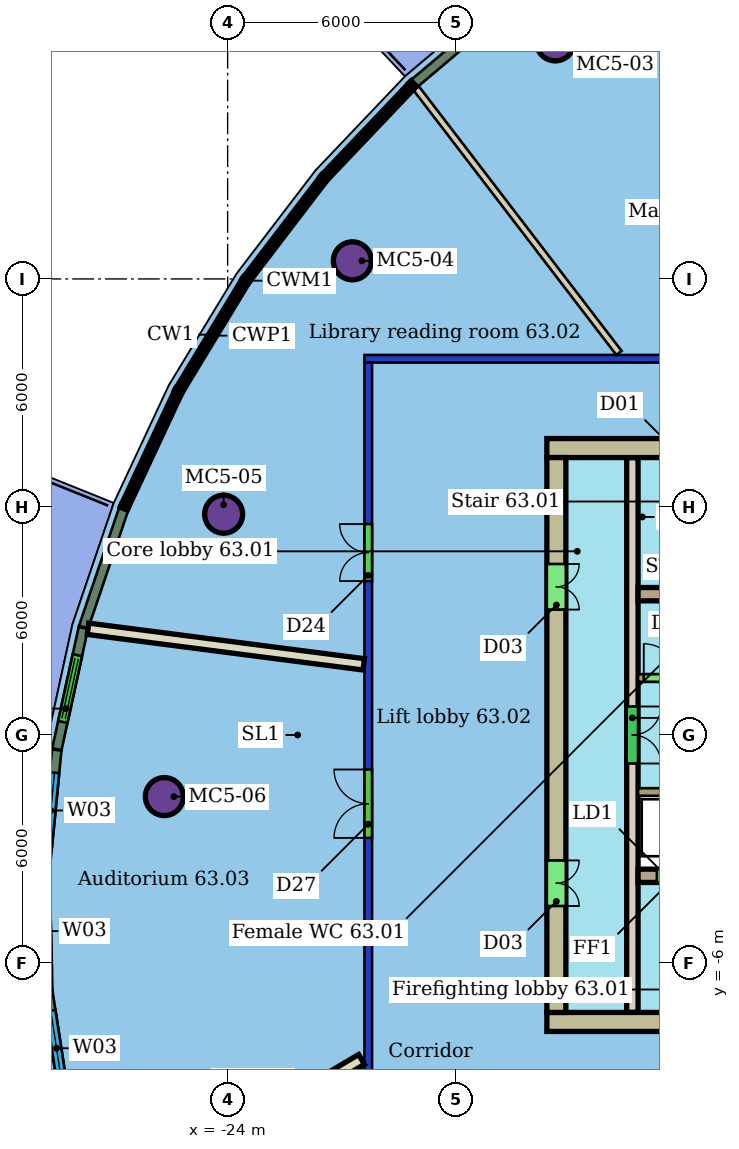
"""IFC4 building model, lengths in metres.
Left out: names, types, materials, properties, quantities, classifications, styles, units other than length and angle.
Written with IfcOpenShell. Run it as: python <this file> out.ifc"""

import sys

from ifc_helpers import new_model, si_unit, direction, frame, frame_2d, origin, origin_2d, place, context, subcontext, project, spatial, rectangle, hollow_circle, extrude, element, fill, save


model = new_model("IFC4")
c1 = context("Model", 3, precision=1e-05, world=origin(), true_north=direction((0.0, 1.0)))
c2 = subcontext(c1, "Body", "Model", "MODEL_VIEW")
j1 = project(units=[si_unit("LENGTHUNIT", "METRE"), si_unit("PLANEANGLEUNIT", "RADIAN")], contexts=[c1])
p1 = place(None, origin())
s1 = spatial("IfcSite", under=j1, at=p1, CompositionType="ELEMENT")
p2 = place(p1, origin())
s2 = spatial("IfcBuilding", under=s1, at=p2, CompositionType="ELEMENT")
p3 = place(p2, frame((0.0, 0.0, 257.7)))
s3 = spatial("IfcBuildingStorey", under=s2, at=p3, CompositionType="ELEMENT", Elevation=257.7)
for number, where, z_axis, x_axis in (
    (1, (-15.377, 18.238, 0.0), (0.0, 0.0, 1.0), (1.0, 0.0, 0.0)),
    (2, (-20.718, 12.477, 0.0), (0.0, 0.0, 1.0), (1.0, 0.0, 0.0)),
    (3, (-24.106, 5.81, 0.0), (0.0, 0.0, 1.0), (1.0, 0.0, 0.0)),
    (4, (-25.666, -1.62, 0.0), (0.0, 0.0, 1.0), (1.0, 0.0, 0.0)),
):
    element("IfcColumn", number, at=place(p3, frame(where, z_axis=z_axis, x_axis=x_axis)), inside=s3, PredefinedType="COLUMN", context=c2, shape_type="SweptSolid", body=[
        extrude(hollow_circle(Radius=0.5, WallThickness=0.04, at=origin_2d()), origin(), (0.0, 0.0, 1.0), 3.45),
    ])
p4 = place(p3, frame((-20.3, -9.8, 0.0), z_axis=(0.0, 0.0, 1.0), x_axis=(0.0, 1.0, 0.0)))
e5 = element("IfcWall", 5, at=p4, inside=s3, PredefinedType="PARTITIONING", context=c2, shape_type="SweptSolid", body=[
    extrude(rectangle(XDim=19.6, YDim=0.2, at=frame_2d((9.8, 0.0))), origin(), (0.0, 0.0, 1.0), 3.1),
])
p5 = place(p4, frame((13.85, 0.0, 0.0)))
e6 = element("IfcOpeningElement", 6, at=p5, cuts=e5, PredefinedType="OPENING", context=c2, shape_type="SweptSolid", body=[
    extrude(rectangle(XDim=1.5, YDim=2.1, at=frame_2d((0.75, 1.05))), frame((0.0, 0.11, 0.0), z_axis=(0.0, -1.0, 0.0), x_axis=(1.0, 0.0, 0.0)), (0.0, 0.0, 1.0), 0.22),
])
p6 = place(p4, frame((7.092, 0.0, 0.0)))
e7 = element("IfcOpeningElement", 7, at=p6, cuts=e5, PredefinedType="OPENING", context=c2, shape_type="SweptSolid", body=[
    extrude(rectangle(XDim=1.8, YDim=2.4, at=frame_2d((0.9, 1.2))), frame((0.0, 0.11, 0.0), z_axis=(0.0, -1.0, 0.0), x_axis=(1.0, 0.0, 0.0)), (0.0, 0.0, 1.0), 0.22),
])
p7 = place(p3, frame((-20.4, 9.9, 0.0), z_axis=(0.0, 0.0, 1.0), x_axis=(1.0, 0.0, 0.0)))
e8 = element("IfcWall", 8, at=p7, inside=s3, PredefinedType="PARTITIONING", context=c2, shape_type="SweptSolid", body=[
    extrude(rectangle(XDim=28.8, YDim=0.2, at=frame_2d((14.4, 0.0))), origin(), (0.0, 0.0, 1.0), 3.1),
])
p8 = place(p7, frame((9.976, 0.0, 0.0)))
e9 = element("IfcOpeningElement", 9, at=p8, cuts=e8, PredefinedType="OPENING", context=c2, shape_type="SweptSolid", body=[
    extrude(rectangle(XDim=1.5, YDim=2.1, at=frame_2d((0.75, 1.05))), frame((0.0, 0.11, 0.0), z_axis=(0.0, -1.0, 0.0), x_axis=(1.0, 0.0, 0.0)), (0.0, 0.0, 1.0), 0.22),
])
p9 = place(p7, frame((21.079, 0.0, 0.0)))
e10 = element("IfcOpeningElement", 10, at=p9, cuts=e8, PredefinedType="OPENING", context=c2, shape_type="SweptSolid", body=[
    extrude(rectangle(XDim=1.0, YDim=2.1, at=frame_2d((0.5, 1.05))), frame((0.0, 0.11, 0.0), z_axis=(0.0, -1.0, 0.0), x_axis=(1.0, 0.0, 0.0)), (0.0, 0.0, 1.0), 0.22),
])
p10 = place(p3, frame((-19.042, 17.022, 0.0), z_axis=(0.0, 0.0, 1.0), x_axis=(0.608204407096, -0.793780447724, 0.0)))
e11 = element("IfcWall", 11, at=p10, inside=s3, PredefinedType="PARTITIONING", context=c2, shape_type="SweptSolid", body=[
    extrude(rectangle(XDim=8.779, YDim=0.175, at=frame_2d((4.389, 0.0))), origin(), (0.0, 0.0, 1.0), 3.45),
])
p11 = place(p3, frame((-27.674, 2.795, 0.0), z_axis=(0.0, 0.0, 1.0), x_axis=(0.991788248046, -0.127890855958, 0.0)))
e12 = element("IfcWall", 12, at=p11, inside=s3, PredefinedType="PARTITIONING", context=c2, shape_type="SweptSolid", body=[
    extrude(rectangle(XDim=7.315, YDim=0.3, at=frame_2d((3.658, 0.0))), origin(), (0.0, 0.0, 1.0), 3.45),
])
p12 = place(p3, frame((-27.309, -12.566, 0.0), z_axis=(0.0, 0.0, 1.0), x_axis=(0.861365558052, 0.507985605506, 0.0)))
e13 = element("IfcWall", 13, at=p12, inside=s3, PredefinedType="PARTITIONING", context=c2, shape_type="SweptSolid", body=[
    extrude(rectangle(XDim=7.932, YDim=0.3, at=frame_2d((3.966, 0.0))), origin(), (0.0, 0.0, 1.0), 3.45),
])
for number, where, z_axis, x_axis in (
    (14, (-16.581, 19.26, 0.0), (0.0, 0.0, 1.0), (-0.765, -0.645, 0.0)),
    (15, (-26.737, 5.941, 0.0), (0.0, 0.0, 1.0), (-0.322, -0.947, 0.0)),
):
    element("IfcWall", number, at=place(p3, frame(where, z_axis=z_axis, x_axis=x_axis)), inside=s3, PredefinedType="SOLIDWALL", context=c2, shape_type="SweptSolid", body=[
        extrude(rectangle(XDim=3.277, YDim=0.25, at=frame_2d((1.638, 0.0))), origin(), (0.0, 0.0, 1.0), 3.15),
    ])
p13 = place(p3, frame((-27.797, 2.818, 0.0), z_axis=(0.0, 0.0, 1.0), x_axis=(-0.213366888583, -0.97697214436, 0.0)))
e16 = element("IfcWall", 16, at=p13, inside=s3, PredefinedType="SOLIDWALL", context=c2, shape_type="SweptSolid", body=[
    extrude(rectangle(XDim=3.266, YDim=0.25, at=frame_2d((1.633, 0.0))), origin(), (0.0, 0.0, 1.0), 3.15),
])
p14 = place(p13, frame((0.733, 0.0, 0.0)))
e17 = element("IfcOpeningElement", 17, at=p14, cuts=e16, PredefinedType="OPENING", context=c2, shape_type="SweptSolid", body=[
    extrude(rectangle(XDim=1.8, YDim=2.4, at=frame_2d((0.9, 1.2))), frame((0.0, 0.135, 0.0), z_axis=(0.0, -1.0, 0.0), x_axis=(1.0, 0.0, 0.0)), (0.0, 0.0, 1.0), 0.27),
])
p15 = place(p3, frame((-28.497, -0.395, 0.0), z_axis=(0.0, 0.0, 1.0), x_axis=(-0.097900668903, -0.995196191225, 0.0)))
e18 = element("IfcWall", 18, at=p15, inside=s3, PredefinedType="SOLIDWALL", context=c2, shape_type="SweptSolid", body=[
    extrude(rectangle(XDim=3.197, YDim=0.25, at=frame_2d((1.599, 0.0))), origin(), (0.0, 0.0, 1.0), 3.15),
])
p16 = place(p15, frame((0.599, 0.0, 0.9)))
e19 = element("IfcOpeningElement", 19, at=p16, cuts=e18, PredefinedType="OPENING", context=c2, shape_type="SweptSolid", body=[
    extrude(rectangle(XDim=2.0, YDim=2.1, at=frame_2d((1.0, 1.05))), frame((0.0, 0.135, 0.0), z_axis=(0.0, -1.0, 0.0), x_axis=(1.0, 0.0, 0.0)), (0.0, 0.0, 1.0), 0.27),
])
p17 = place(p3, frame((-28.811, -3.6, 0.0), z_axis=(0.0, 0.0, 1.0), x_axis=(0.024112016682, -0.999709263062, 0.0)))
e20 = element("IfcWall", 20, at=p17, inside=s3, PredefinedType="SOLIDWALL", context=c2, shape_type="SweptSolid", body=[
    extrude(rectangle(XDim=3.119, YDim=0.25, at=frame_2d((1.559, 0.0))), origin(), (0.0, 0.0, 1.0), 3.15),
])
p18 = place(p17, frame((0.559, 0.0, 0.9)))
e21 = element("IfcOpeningElement", 21, at=p18, cuts=e20, PredefinedType="OPENING", context=c2, shape_type="SweptSolid", body=[
    extrude(rectangle(XDim=2.0, YDim=2.1, at=frame_2d((1.0, 1.05))), frame((0.0, 0.135, 0.0), z_axis=(0.0, -1.0, 0.0), x_axis=(1.0, 0.0, 0.0)), (0.0, 0.0, 1.0), 0.27),
])
p19 = place(p3, frame((-28.734, -6.742, 0.0), z_axis=(0.0, 0.0, 1.0), x_axis=(0.151930263347, -0.988391215602, 0.0)))
e22 = element("IfcWall", 22, at=p19, inside=s3, PredefinedType="SOLIDWALL", context=c2, shape_type="SweptSolid", body=[
    extrude(rectangle(XDim=3.035, YDim=0.25, at=frame_2d((1.518, 0.0))), origin(), (0.0, 0.0, 1.0), 3.15),
])
p20 = place(p19, frame((0.518, 0.0, 0.9)))
e23 = element("IfcOpeningElement", 23, at=p20, cuts=e22, PredefinedType="OPENING", context=c2, shape_type="SweptSolid", body=[
    extrude(rectangle(XDim=2.0, YDim=2.1, at=frame_2d((1.0, 1.05))), frame((0.0, 0.135, 0.0), z_axis=(0.0, -1.0, 0.0), x_axis=(1.0, 0.0, 0.0)), (0.0, 0.0, 1.0), 0.27),
])
p21 = place(p3, frame((-6.0, 7.55, 0.0), z_axis=(0.0, 0.0, 1.0), x_axis=(-1.0, 0.0, 0.0)))
e24 = element("IfcWall", 24, at=p21, inside=s3, PredefinedType="SHEAR", context=c2, shape_type="SweptSolid", body=[
    extrude(rectangle(XDim=9.6, YDim=0.5, at=frame_2d((4.8, 0.0))), origin(), (0.0, 0.0, 1.0), 3.3),
])
p22 = place(p21, frame((5.2, 0.0, 0.0)))
e25 = element("IfcOpeningElement", 25, at=p22, cuts=e24, PredefinedType="OPENING", context=c2, shape_type="SweptSolid", body=[
    extrude(rectangle(XDim=1.2, YDim=2.1, at=frame_2d((0.6, 1.05))), frame((0.0, 0.26, 0.0), z_axis=(0.0, -1.0, 0.0), x_axis=(1.0, 0.0, 0.0)), (0.0, 0.0, 1.0), 0.52),
])
p23 = place(p3, frame((-15.6, -7.55, 0.0), z_axis=(0.0, 0.0, 1.0), x_axis=(1.0, 0.0, 0.0)))
e26 = element("IfcWall", 26, at=p23, inside=s3, PredefinedType="SHEAR", context=c2, shape_type="SweptSolid", body=[
    extrude(rectangle(XDim=19.2, YDim=0.5, at=frame_2d((9.6, 0.0))), origin(), (0.0, 0.0, 1.0), 3.3),
])
p24 = place(p23, frame((3.6, 0.0, 0.0)))
e27 = element("IfcOpeningElement", 27, at=p24, cuts=e26, PredefinedType="OPENING", context=c2, shape_type="SweptSolid", body=[
    extrude(rectangle(XDim=1.2, YDim=2.1, at=frame_2d((0.6, 1.05))), frame((0.0, 0.26, 0.0), z_axis=(0.0, -1.0, 0.0), x_axis=(1.0, 0.0, 0.0)), (0.0, 0.0, 1.0), 0.52),
])
p25 = place(p3, frame((-15.35, 7.3, 0.0), z_axis=(0.0, 0.0, 1.0), x_axis=(0.0, -1.0, 0.0)))
e28 = element("IfcWall", 28, at=p25, inside=s3, PredefinedType="SHEAR", context=c2, shape_type="SweptSolid", body=[
    extrude(rectangle(XDim=14.6, YDim=0.5, at=frame_2d((7.3, 0.0))), origin(), (0.0, 0.0, 1.0), 3.3),
])
p26 = place(p25, frame((10.6, 0.0, 0.0)))
e29 = element("IfcOpeningElement", 29, at=p26, cuts=e28, PredefinedType="OPENING", context=c2, shape_type="SweptSolid", body=[
    extrude(rectangle(XDim=1.2, YDim=2.1, at=frame_2d((0.6, 1.05))), frame((0.0, 0.26, 0.0), z_axis=(0.0, -1.0, 0.0), x_axis=(1.0, 0.0, 0.0)), (0.0, 0.0, 1.0), 0.52),
])
p27 = place(p25, frame((2.8, 0.0, 0.0)))
e30 = element("IfcOpeningElement", 30, at=p27, cuts=e28, PredefinedType="OPENING", context=c2, shape_type="SweptSolid", body=[
    extrude(rectangle(XDim=1.2, YDim=2.1, at=frame_2d((0.6, 1.05))), frame((0.0, 0.26, 0.0), z_axis=(0.0, -1.0, 0.0), x_axis=(1.0, 0.0, 0.0)), (0.0, 0.0, 1.0), 0.52),
])
p28 = place(p3, frame((-13.2, 3.705, 0.0), z_axis=(0.0, 0.0, 1.0), x_axis=(1.0, 0.0, 0.0)))
e31 = element("IfcWall", 31, at=p28, inside=s3, PredefinedType="SHEAR", context=c2, shape_type="SweptSolid", body=[
    extrude(rectangle(XDim=7.2, YDim=0.35, at=frame_2d((3.6, 0.0))), origin(), (0.0, 0.0, 1.0), 3.3),
])
p29 = place(p3, frame((-13.2, -3.705, 0.0), z_axis=(0.0, 0.0, 1.0), x_axis=(1.0, 0.0, 0.0)))
e32 = element("IfcWall", 32, at=p29, inside=s3, PredefinedType="SHEAR", context=c2, shape_type="SweptSolid", body=[
    extrude(rectangle(XDim=7.2, YDim=0.35, at=frame_2d((3.6, 0.0))), origin(), (0.0, 0.0, 1.0), 3.3),
])
p30 = place(p29, frame((0.496, 0.0, 0.0)))
e33 = element("IfcOpeningElement", 33, at=p30, cuts=e32, PredefinedType="OPENING", context=c2, shape_type="SweptSolid", body=[
    extrude(rectangle(XDim=1.2, YDim=2.1, at=frame_2d((0.6, 1.05))), frame((0.0, 0.185, 0.0), z_axis=(0.0, -1.0, 0.0), x_axis=(1.0, 0.0, 0.0)), (0.0, 0.0, 1.0), 0.37),
])
p31 = place(p29, frame((2.938, 0.0, 0.0)))
e34 = element("IfcOpeningElement", 34, at=p31, cuts=e32, PredefinedType="OPENING", context=c2, shape_type="SweptSolid", body=[
    extrude(rectangle(XDim=1.2, YDim=2.1, at=frame_2d((0.6, 1.05))), frame((0.0, 0.185, 0.0), z_axis=(0.0, -1.0, 0.0), x_axis=(1.0, 0.0, 0.0)), (0.0, 0.0, 1.0), 0.37),
])
p32 = place(p3, frame((-13.35, 7.3, 0.0), z_axis=(0.0, 0.0, 1.0), x_axis=(0.0, -1.0, 0.0)))
e35 = element("IfcWall", 35, at=p32, inside=s3, PredefinedType="SHEAR", context=c2, shape_type="SweptSolid", body=[
    extrude(rectangle(XDim=14.6, YDim=0.3, at=frame_2d((7.3, 0.0))), origin(), (0.0, 0.0, 1.0), 3.3),
])
p33 = place(p32, frame((6.55, 0.0, 0.0)))
e36 = element("IfcOpeningElement", 36, at=p33, cuts=e35, PredefinedType="OPENING", context=c2, shape_type="SweptSolid", body=[
    extrude(rectangle(XDim=1.5, YDim=2.1, at=frame_2d((0.75, 1.05))), frame((0.0, 0.16, 0.0), z_axis=(0.0, -1.0, 0.0), x_axis=(1.0, 0.0, 0.0)), (0.0, 0.0, 1.0), 0.32),
])
p34 = place(p3, frame((-13.2, 1.5, 0.0), z_axis=(0.0, 0.0, 1.0), x_axis=(1.0, 0.0, 0.0)))
e37 = element("IfcWall", 37, at=p34, inside=s3, PredefinedType="SHEAR", context=c2, shape_type="SweptSolid", body=[
    extrude(rectangle(XDim=14.4, YDim=0.2, at=frame_2d((7.2, 0.0))), origin(), (0.0, 0.0, 1.0), 3.3),
])
p35 = place(p34, frame((10.312, 0.0, 0.0)))
e38 = element("IfcOpeningElement", 38, at=p35, cuts=e37, PredefinedType="OPENING", context=c2, shape_type="SweptSolid", body=[
    extrude(rectangle(XDim=1.1, YDim=2.1, at=frame_2d((0.55, 1.05))), frame((0.0, 0.11, 0.0), z_axis=(0.0, -1.0, 0.0), x_axis=(1.0, 0.0, 0.0)), (0.0, 0.0, 1.0), 0.22),
])
p36 = place(p34, frame((12.754, 0.0, 0.0)))
e39 = element("IfcOpeningElement", 39, at=p36, cuts=e37, PredefinedType="OPENING", context=c2, shape_type="SweptSolid", body=[
    extrude(rectangle(XDim=1.1, YDim=2.1, at=frame_2d((0.55, 1.05))), frame((0.0, 0.11, 0.0), z_axis=(0.0, -1.0, 0.0), x_axis=(1.0, 0.0, 0.0)), (0.0, 0.0, 1.0), 0.22),
])
p37 = place(p34, frame((0.15, 0.0, 0.0)))
e40 = element("IfcOpeningElement", 40, at=p37, cuts=e37, PredefinedType="OPENING", context=c2, shape_type="SweptSolid", body=[
    extrude(rectangle(XDim=0.9, YDim=2.1, at=frame_2d((0.45, 1.05))), frame((0.0, 0.11, 0.0), z_axis=(0.0, -1.0, 0.0), x_axis=(1.0, 0.0, 0.0)), (0.0, 0.0, 1.0), 0.22),
])
p38 = place(p34, frame((4.222, 0.0, 0.0)))
e41 = element("IfcOpeningElement", 41, at=p38, cuts=e37, PredefinedType="OPENING", context=c2, shape_type="SweptSolid", body=[
    extrude(rectangle(XDim=0.9, YDim=2.1, at=frame_2d((0.45, 1.05))), frame((0.0, 0.11, 0.0), z_axis=(0.0, -1.0, 0.0), x_axis=(1.0, 0.0, 0.0)), (0.0, 0.0, 1.0), 0.22),
])
p39 = place(p34, frame((8.367, 0.0, 0.0)))
e42 = element("IfcOpeningElement", 42, at=p39, cuts=e37, PredefinedType="OPENING", context=c2, shape_type="SweptSolid", body=[
    extrude(rectangle(XDim=1.0, YDim=2.1, at=frame_2d((0.5, 1.05))), frame((0.0, 0.11, 0.0), z_axis=(0.0, -1.0, 0.0), x_axis=(1.0, 0.0, 0.0)), (0.0, 0.0, 1.0), 0.22),
])
p40 = place(p3, frame((1.2, -1.5, 0.0), z_axis=(0.0, 0.0, 1.0), x_axis=(-1.0, 0.0, 0.0)))
e43 = element("IfcWall", 43, at=p40, inside=s3, PredefinedType="SHEAR", context=c2, shape_type="SweptSolid", body=[
    extrude(rectangle(XDim=14.4, YDim=0.2, at=frame_2d((7.2, 0.0))), origin(), (0.0, 0.0, 1.0), 3.3),
])
p41 = place(p40, frame((7.821, 0.0, 0.0)))
e44 = element("IfcOpeningElement", 44, at=p41, cuts=e43, PredefinedType="OPENING", context=c2, shape_type="SweptSolid", body=[
    extrude(rectangle(XDim=1.2, YDim=2.1, at=frame_2d((0.6, 1.05))), frame((0.0, 0.11, 0.0), z_axis=(0.0, -1.0, 0.0), x_axis=(1.0, 0.0, 0.0)), (0.0, 0.0, 1.0), 0.22),
])
p42 = place(p40, frame((0.546, 0.0, 0.0)))
e45 = element("IfcOpeningElement", 45, at=p42, cuts=e43, PredefinedType="OPENING", context=c2, shape_type="SweptSolid", body=[
    extrude(rectangle(XDim=1.1, YDim=2.1, at=frame_2d((0.55, 1.05))), frame((0.0, 0.11, 0.0), z_axis=(0.0, -1.0, 0.0), x_axis=(1.0, 0.0, 0.0)), (0.0, 0.0, 1.0), 0.22),
])
p43 = place(p40, frame((4.983, 0.0, 0.0)))
e46 = element("IfcOpeningElement", 46, at=p43, cuts=e43, PredefinedType="OPENING", context=c2, shape_type="SweptSolid", body=[
    extrude(rectangle(XDim=1.0, YDim=2.1, at=frame_2d((0.5, 1.05))), frame((0.0, 0.11, 0.0), z_axis=(0.0, -1.0, 0.0), x_axis=(1.0, 0.0, 0.0)), (0.0, 0.0, 1.0), 0.22),
])
p44 = place(p40, frame((2.592, 0.0, 0.0)))
e47 = element("IfcOpeningElement", 47, at=p44, cuts=e43, PredefinedType="OPENING", context=c2, shape_type="SweptSolid", body=[
    extrude(rectangle(XDim=1.0, YDim=2.1, at=frame_2d((0.5, 1.05))), frame((0.0, 0.11, 0.0), z_axis=(0.0, -1.0, 0.0), x_axis=(1.0, 0.0, 0.0)), (0.0, 0.0, 1.0), 0.22),
])
p45 = place(p5, origin())
e48 = element("IfcDoor", 48, at=p45, inside=s3, OperationType="DOUBLE_DOOR_SINGLE_SWING", PredefinedType="DOOR", context=c2, shape_type="SweptSolid", body=[
    extrude(rectangle(XDim=1.5, YDim=2.1, at=frame_2d((0.75, 1.05))), frame((0.0, 0.025, 0.0), z_axis=(0.0, -1.0, 0.0), x_axis=(1.0, 0.0, 0.0)), (0.0, 0.0, 1.0), 0.05),
])
fill(e6, e48)
p46 = place(p6, origin())
e49 = element("IfcDoor", 49, at=p46, inside=s3, OperationType="DOUBLE_DOOR_SINGLE_SWING", PredefinedType="DOOR", context=c2, shape_type="SweptSolid", body=[
    extrude(rectangle(XDim=1.8, YDim=2.4, at=frame_2d((0.9, 1.2))), frame((0.0, 0.025, 0.0), z_axis=(0.0, -1.0, 0.0), x_axis=(1.0, 0.0, 0.0)), (0.0, 0.0, 1.0), 0.05),
])
fill(e7, e49)
p47 = place(p14, origin())
e50 = element("IfcDoor", 50, at=p47, inside=s3, OperationType="DOUBLE_DOOR_SLIDING", PredefinedType="DOOR", context=c2, shape_type="SweptSolid", body=[
    extrude(rectangle(XDim=1.8, YDim=2.4, at=frame_2d((0.9, 1.2))), frame((0.0, 0.025, 0.0), z_axis=(0.0, -1.0, 0.0), x_axis=(1.0, 0.0, 0.0)), (0.0, 0.0, 1.0), 0.05),
])
fill(e17, e50)
p48 = place(p16, origin())
e51 = element("IfcWindow", 51, at=p48, inside=s3, PartitioningType="SINGLE_PANEL", PredefinedType="WINDOW", context=c2, shape_type="SweptSolid", body=[
    extrude(rectangle(XDim=2.0, YDim=2.1, at=frame_2d((1.0, 1.05))), frame((0.0, 0.03, 0.0), z_axis=(0.0, -1.0, 0.0), x_axis=(1.0, 0.0, 0.0)), (0.0, 0.0, 1.0), 0.06),
])
fill(e19, e51)
p49 = place(p20, origin())
e52 = element("IfcWindow", 52, at=p49, inside=s3, PartitioningType="SINGLE_PANEL", PredefinedType="WINDOW", context=c2, shape_type="SweptSolid", body=[
    extrude(rectangle(XDim=2.0, YDim=2.1, at=frame_2d((1.0, 1.05))), frame((0.0, 0.03, 0.0), z_axis=(0.0, -1.0, 0.0), x_axis=(1.0, 0.0, 0.0)), (0.0, 0.0, 1.0), 0.06),
])
fill(e23, e52)
p50 = place(p26, origin())
e53 = element("IfcDoor", 53, at=p50, inside=s3, OperationType="DOUBLE_DOOR_SINGLE_SWING", PredefinedType="NOTDEFINED", context=c2, shape_type="SweptSolid", body=[
    extrude(rectangle(XDim=1.2, YDim=2.1, at=frame_2d((0.6, 1.05))), frame((0.0, 0.025, 0.0), z_axis=(0.0, -1.0, 0.0), x_axis=(1.0, 0.0, 0.0)), (0.0, 0.0, 1.0), 0.05),
])
fill(e29, e53)
p51 = place(p27, origin())
e54 = element("IfcDoor", 54, at=p51, inside=s3, OperationType="DOUBLE_DOOR_SINGLE_SWING", PredefinedType="NOTDEFINED", context=c2, shape_type="SweptSolid", body=[
    extrude(rectangle(XDim=1.2, YDim=2.1, at=frame_2d((0.6, 1.05))), frame((0.0, 0.025, 0.0), z_axis=(0.0, -1.0, 0.0), x_axis=(1.0, 0.0, 0.0)), (0.0, 0.0, 1.0), 0.05),
])
fill(e30, e54)
p52 = place(p30, origin())
e55 = element("IfcDoor", 55, at=p52, inside=s3, OperationType="DOUBLE_DOOR_SLIDING", PredefinedType="NOTDEFINED", context=c2, shape_type="SweptSolid", body=[
    extrude(rectangle(XDim=1.2, YDim=2.1, at=frame_2d((0.6, 1.05))), frame((0.0, 0.025, 0.0), z_axis=(0.0, -1.0, 0.0), x_axis=(1.0, 0.0, 0.0)), (0.0, 0.0, 1.0), 0.05),
])
fill(e33, e55)
p53 = place(p33, origin())
e56 = element("IfcDoor", 56, at=p53, inside=s3, OperationType="DOUBLE_DOOR_SINGLE_SWING", PredefinedType="NOTDEFINED", context=c2, shape_type="SweptSolid", body=[
    extrude(rectangle(XDim=1.5, YDim=2.1, at=frame_2d((0.75, 1.05))), frame((0.0, 0.025, 0.0), z_axis=(0.0, -1.0, 0.0), x_axis=(1.0, 0.0, 0.0)), (0.0, 0.0, 1.0), 0.05),
])
fill(e36, e56)
p54 = place(p37, origin())
e57 = element("IfcDoor", 57, at=p54, inside=s3, OperationType="SINGLE_SWING_LEFT", PredefinedType="NOTDEFINED", context=c2, shape_type="SweptSolid", body=[
    extrude(rectangle(XDim=0.9, YDim=2.1, at=frame_2d((0.45, 1.05))), frame((0.0, 0.025, 0.0), z_axis=(0.0, -1.0, 0.0), x_axis=(1.0, 0.0, 0.0)), (0.0, 0.0, 1.0), 0.05),
])
fill(e40, e57)
save(model, sys.argv[1])
